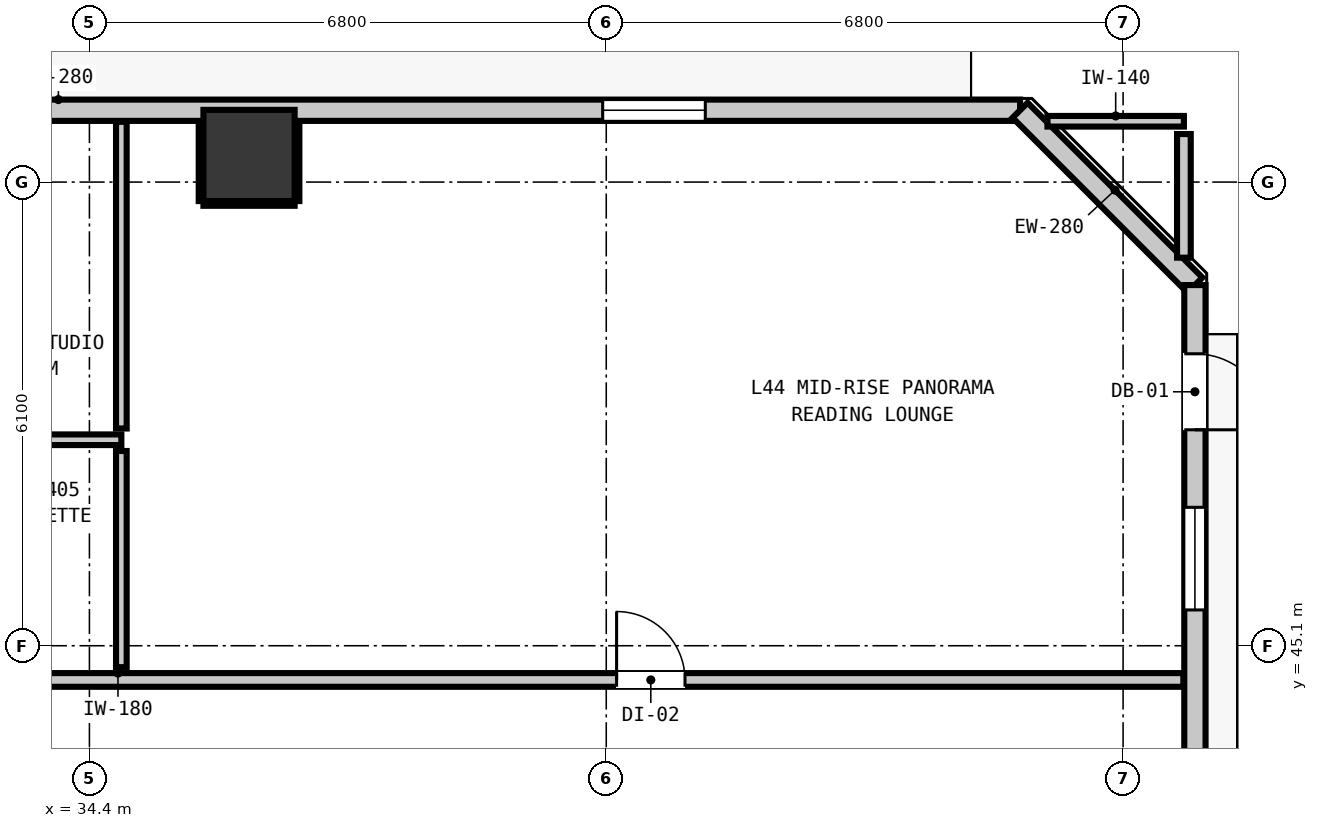
"""IFC4 building model, lengths in metres.
Left out: names, types, materials, properties, quantities, classifications, styles, units other than length and angle.
Written with IfcOpenShell. Run it as: python <this file> out.ifc"""

import sys

from ifc_helpers import new_model, si_unit, direction, frame, frame_2d, origin, origin_2d, place, context, subcontext, project, spatial, rectangle, extrude, element, fill, save


model = new_model("IFC4")
c1 = context("Model", 3, precision=1e-05, world=origin(), true_north=direction((0.0, 1.0)))
c2 = subcontext(c1, "Body", "Model", "MODEL_VIEW")
j1 = project(units=[si_unit("LENGTHUNIT", "METRE"), si_unit("PLANEANGLEUNIT", "RADIAN")], contexts=[c1])
p1 = place(None, origin())
s1 = spatial("IfcSite", under=j1, at=p1, CompositionType="ELEMENT")
p2 = place(p1, origin())
s2 = spatial("IfcBuilding", under=s1, at=p2, CompositionType="ELEMENT")
p3 = place(p2, frame((0.0, 0.0, 152.56)))
s3 = spatial("IfcBuildingStorey", under=s2, at=p3, CompositionType="ELEMENT", Elevation=152.56)
p4 = place(p3, frame((36.5, 51.55, 0.0), z_axis=(0.0, 0.0, 1.0), x_axis=(1.0, 0.0, 0.0)))
e1 = element("IfcColumn", 1, at=p4, inside=s3, PredefinedType="COLUMN", context=c2, shape_type="SweptSolid", body=[
    extrude(rectangle(XDim=1.2, YDim=1.2, at=origin_2d()), origin(), (0.0, 0.0, 1.0), 3.32),
])
p5 = place(p3, frame((11.555, 52.145, 0.0), z_axis=(0.0, 0.0, 1.0), x_axis=(1.0, 0.0, 0.0)))
e2 = element("IfcWall", 2, at=p5, inside=s3, PredefinedType="STANDARD", context=c2, shape_type="SweptSolid", body=[
    extrude(rectangle(XDim=35.09, YDim=0.28, at=frame_2d((17.545, 0.0))), origin(), (0.0, 0.0, 1.0), 3.08),
])
p6 = place(p5, frame((4.062, 0.0, 0.0)))
e3 = element("IfcOpeningElement", 3, at=p6, cuts=e2, PredefinedType="OPENING", context=c2, shape_type="SweptSolid", body=[
    extrude(rectangle(XDim=1.0, YDim=2.15, at=frame_2d((0.5, 1.075))), frame((0.0, 0.15, 0.0), z_axis=(0.0, -1.0, 0.0), x_axis=(1.0, 0.0, 0.0)), (0.0, 0.0, 1.0), 0.3),
])
p7 = place(p5, frame((5.738, 0.0, 0.85)))
e4 = element("IfcOpeningElement", 4, at=p7, cuts=e2, PredefinedType="OPENING", context=c2, shape_type="SweptSolid", body=[
    extrude(rectangle(XDim=1.35, YDim=1.85, at=frame_2d((0.675, 0.925))), frame((0.0, 0.15, 0.0), z_axis=(0.0, -1.0, 0.0), x_axis=(1.0, 0.0, 0.0)), (0.0, 0.0, 1.0), 0.3),
])
p8 = place(p5, frame((0.378, 0.0, 0.85)))
e5 = element("IfcOpeningElement", 5, at=p8, cuts=e2, PredefinedType="OPENING", context=c2, shape_type="SweptSolid", body=[
    extrude(rectangle(XDim=0.58, YDim=1.5, at=frame_2d((0.29, 0.75))), frame((0.0, 0.15, 0.0), z_axis=(0.0, -1.0, 0.0), x_axis=(1.0, 0.0, 0.0)), (0.0, 0.0, 1.0), 0.3),
])
p9 = place(p5, frame((13.925, 0.0, 0.85)))
e6 = element("IfcOpeningElement", 6, at=p9, cuts=e2, PredefinedType="OPENING", context=c2, shape_type="SweptSolid", body=[
    extrude(rectangle(XDim=1.35, YDim=1.85, at=frame_2d((0.675, 0.925))), frame((0.0, 0.15, 0.0), z_axis=(0.0, -1.0, 0.0), x_axis=(1.0, 0.0, 0.0)), (0.0, 0.0, 1.0), 0.3),
])
p10 = place(p5, frame((29.598, 0.0, 0.85)))
e7 = element("IfcOpeningElement", 7, at=p10, cuts=e2, PredefinedType="OPENING", context=c2, shape_type="SweptSolid", body=[
    extrude(rectangle(XDim=1.35, YDim=1.85, at=frame_2d((0.675, 0.925))), frame((0.0, 0.15, 0.0), z_axis=(0.0, -1.0, 0.0), x_axis=(1.0, 0.0, 0.0)), (0.0, 0.0, 1.0), 0.3),
])
p11 = place(p3, frame((46.645, 52.145, 0.0), z_axis=(0.0, 0.0, 1.0), x_axis=(0.707106781187, -0.707106781187, 0.0)))
e8 = element("IfcWall", 8, at=p11, inside=s3, PredefinedType="STANDARD", context=c2, shape_type="SweptSolid", body=[
    extrude(rectangle(XDim=3.253, YDim=0.28, at=frame_2d((1.626, 0.0))), origin(), (0.0, 0.0, 1.0), 3.08),
])
p12 = place(p3, frame((48.945, 49.845, 0.0), z_axis=(0.0, 0.0, 1.0), x_axis=(0.0, -1.0, 0.0)))
e9 = element("IfcWall", 9, at=p12, inside=s3, PredefinedType="STANDARD", context=c2, shape_type="SweptSolid", body=[
    extrude(rectangle(XDim=32.29, YDim=0.28, at=frame_2d((16.145, 0.0))), origin(), (0.0, 0.0, 1.0), 3.08),
])
p13 = place(p12, frame((0.904, 0.0, 0.0)))
e10 = element("IfcOpeningElement", 10, at=p13, cuts=e9, PredefinedType="OPENING", context=c2, shape_type="SweptSolid", body=[
    extrude(rectangle(XDim=1.0, YDim=2.15, at=frame_2d((0.5, 1.075))), frame((0.0, 0.15, 0.0), z_axis=(0.0, -1.0, 0.0), x_axis=(1.0, 0.0, 0.0)), (0.0, 0.0, 1.0), 0.3),
])
p14 = place(p12, frame((2.924, 0.0, 0.85)))
e11 = element("IfcOpeningElement", 11, at=p14, cuts=e9, PredefinedType="OPENING", context=c2, shape_type="SweptSolid", body=[
    extrude(rectangle(XDim=1.35, YDim=1.85, at=frame_2d((0.675, 0.925))), frame((0.0, 0.15, 0.0), z_axis=(0.0, -1.0, 0.0), x_axis=(1.0, 0.0, 0.0)), (0.0, 0.0, 1.0), 0.3),
])
p15 = place(p12, frame((21.186, 0.0, 0.85)))
e12 = element("IfcOpeningElement", 12, at=p15, cuts=e9, PredefinedType="OPENING", context=c2, shape_type="SweptSolid", body=[
    extrude(rectangle(XDim=1.35, YDim=1.85, at=frame_2d((0.675, 0.925))), frame((0.0, 0.15, 0.0), z_axis=(0.0, -1.0, 0.0), x_axis=(1.0, 0.0, 0.0)), (0.0, 0.0, 1.0), 0.3),
])
p16 = place(p12, frame((12.195, 0.0, 0.85)))
e13 = element("IfcOpeningElement", 13, at=p16, cuts=e9, PredefinedType="OPENING", context=c2, shape_type="SweptSolid", body=[
    extrude(rectangle(XDim=1.35, YDim=1.85, at=frame_2d((0.675, 0.925))), frame((0.0, 0.15, 0.0), z_axis=(0.0, -1.0, 0.0), x_axis=(1.0, 0.0, 0.0)), (0.0, 0.0, 1.0), 0.3),
])
p17 = place(p3, frame((9.407, 44.65, 0.0), z_axis=(0.0, 0.0, 1.0), x_axis=(1.0, 0.0, 0.0)))
e14 = element("IfcWall", 14, at=p17, inside=s3, PredefinedType="PARTITIONING", context=c2, shape_type="SweptSolid", body=[
    extrude(rectangle(XDim=39.386, YDim=0.18, at=frame_2d((19.693, 0.0))), origin(), (0.0, 0.0, 1.0), 3.08),
])
p18 = place(p17, frame((7.193, 0.0, 0.0)))
e15 = element("IfcOpeningElement", 15, at=p18, cuts=e14, PredefinedType="OPENING", context=c2, shape_type="SweptSolid", body=[
    extrude(rectangle(XDim=1.0, YDim=2.15, at=frame_2d((0.5, 1.075))), frame((0.0, 0.1, 0.0), z_axis=(0.0, -1.0, 0.0), x_axis=(1.0, 0.0, 0.0)), (0.0, 0.0, 1.0), 0.2),
])
p19 = place(p17, frame((17.808, 0.0, 0.0)))
e16 = element("IfcOpeningElement", 16, at=p19, cuts=e14, PredefinedType="OPENING", context=c2, shape_type="SweptSolid", body=[
    extrude(rectangle(XDim=1.0, YDim=2.15, at=frame_2d((0.5, 1.075))), frame((0.0, 0.1, 0.0), z_axis=(0.0, -1.0, 0.0), x_axis=(1.0, 0.0, 0.0)), (0.0, 0.0, 1.0), 0.2),
])
p20 = place(p17, frame((31.929, 0.0, 0.0)))
e17 = element("IfcOpeningElement", 17, at=p20, cuts=e14, PredefinedType="OPENING", context=c2, shape_type="SweptSolid", body=[
    extrude(rectangle(XDim=0.9, YDim=2.1, at=frame_2d((0.45, 1.05))), frame((0.0, 0.1, 0.0), z_axis=(0.0, -1.0, 0.0), x_axis=(1.0, 0.0, 0.0)), (0.0, 0.0, 1.0), 0.2),
])
p21 = place(p3, frame((31.82, 47.81, 0.0), z_axis=(0.0, 0.0, 1.0), x_axis=(1.0, 0.0, 0.0)))
e18 = element("IfcWall", 18, at=p21, inside=s3, PredefinedType="PARTITIONING", context=c2, shape_type="SweptSolid", body=[
    extrude(rectangle(XDim=3.0, YDim=0.14, at=frame_2d((1.5, 0.0))), origin(), (0.0, 0.0, 1.0), 3.08),
])
p22 = place(p3, frame((47.005, 52.0, 0.0), z_axis=(0.0, 0.0, 1.0), x_axis=(1.0, 0.0, 0.0)))
e19 = element("IfcWall", 19, at=p22, inside=s3, PredefinedType="PARTITIONING", context=c2, shape_type="SweptSolid", body=[
    extrude(rectangle(XDim=1.795, YDim=0.14, at=frame_2d((0.897, 0.0))), origin(), (0.0, 0.0, 1.0), 3.08),
])
p23 = place(p3, frame((48.8, 50.205, 0.0), z_axis=(0.0, 0.0, 1.0), x_axis=(0.0, 1.0, 0.0)))
e20 = element("IfcWall", 20, at=p23, inside=s3, PredefinedType="PARTITIONING", context=c2, shape_type="SweptSolid", body=[
    extrude(rectangle(XDim=1.627, YDim=0.18, at=frame_2d((0.813, 0.0))), origin(), (0.0, 0.0, 1.0), 3.08),
])
p24 = place(p3, frame((34.82, 44.818, 0.0), z_axis=(0.0, 0.0, 1.0), x_axis=(0.0, 1.0, 0.0)))
e21 = element("IfcWall", 21, at=p24, inside=s3, PredefinedType="PARTITIONING", context=c2, shape_type="SweptSolid", body=[
    extrude(rectangle(XDim=2.844, YDim=0.14, at=frame_2d((1.422, 0.0))), origin(), (0.0, 0.0, 1.0), 3.08),
])
p25 = place(p3, frame((34.82, 47.958, 0.0), z_axis=(0.0, 0.0, 1.0), x_axis=(0.0, 1.0, 0.0)))
e22 = element("IfcWall", 22, at=p25, inside=s3, PredefinedType="PARTITIONING", context=c2, shape_type="SweptSolid", body=[
    extrude(rectangle(XDim=4.035, YDim=0.14, at=frame_2d((2.018, 0.0))), origin(), (0.0, 0.0, 1.0), 3.08),
])
p26 = place(p3, frame((35.9, 50.918, 0.0), z_axis=(0.0, 0.0, 1.0), x_axis=(1.0, 0.0, 0.0)))
e23 = element("IfcWall", 23, at=p26, inside=s3, PredefinedType="PARTITIONING", context=c2, shape_type="SweptSolid", body=[
    extrude(rectangle(XDim=1.2, YDim=0.06, at=frame_2d((0.6, 0.0))), origin(), (0.0, 0.0, 1.0), 1.45),
])
for number, where, z_axis, x_axis in (
    (24, (35.868, 50.95, 0.0), (0.0, 0.0, 1.0), (0.0, 1.0, 0.0)),
    (25, (37.132, 50.95, 0.0), (0.0, 0.0, 1.0), (0.0, 1.0, 0.0)),
):
    element("IfcWall", number, at=place(p3, frame(where, z_axis=z_axis, x_axis=x_axis)), inside=s3, PredefinedType="PARTITIONING", context=c2, shape_type="SweptSolid", body=[
        extrude(rectangle(XDim=1.04, YDim=0.06, at=frame_2d((0.52, 0.0))), origin(), (0.0, 0.0, 1.0), 1.45),
    ])
p27 = place(p13, origin())
e26 = element("IfcDoor", 26, at=p27, inside=s3, OperationType="SINGLE_SWING_RIGHT", PredefinedType="DOOR", context=c2, shape_type="SweptSolid", body=[
    extrude(rectangle(XDim=1.0, YDim=2.15, at=frame_2d((0.5, 1.075))), frame((0.0, 0.025, 0.0), z_axis=(0.0, -1.0, 0.0), x_axis=(1.0, 0.0, 0.0)), (0.0, 0.0, 1.0), 0.05),
])
fill(e10, e26)
p28 = place(p10, origin())
e27 = element("IfcWindow", 27, at=p28, inside=s3, PartitioningType="SINGLE_PANEL", PredefinedType="WINDOW", context=c2, shape_type="SweptSolid", body=[
    extrude(rectangle(XDim=1.35, YDim=1.85, at=frame_2d((0.675, 0.925))), frame((0.0, 0.03, 0.0), z_axis=(0.0, -1.0, 0.0), x_axis=(1.0, 0.0, 0.0)), (0.0, 0.0, 1.0), 0.06),
])
fill(e7, e27)
p29 = place(p14, origin())
e28 = element("IfcWindow", 28, at=p29, inside=s3, PartitioningType="SINGLE_PANEL", PredefinedType="WINDOW", context=c2, shape_type="SweptSolid", body=[
    extrude(rectangle(XDim=1.35, YDim=1.85, at=frame_2d((0.675, 0.925))), frame((0.0, 0.03, 0.0), z_axis=(0.0, -1.0, 0.0), x_axis=(1.0, 0.0, 0.0)), (0.0, 0.0, 1.0), 0.06),
])
fill(e11, e28)
p30 = place(p20, origin())
e29 = element("IfcDoor", 29, at=p30, inside=s3, OperationType="SINGLE_SWING_LEFT", PredefinedType="DOOR", context=c2, shape_type="SweptSolid", body=[
    extrude(rectangle(XDim=0.9, YDim=2.1, at=frame_2d((0.45, 1.05))), frame((0.0, 0.025, 0.0), z_axis=(0.0, -1.0, 0.0), x_axis=(1.0, 0.0, 0.0)), (0.0, 0.0, 1.0), 0.05),
])
fill(e17, e29)
save(model, sys.argv[1])
